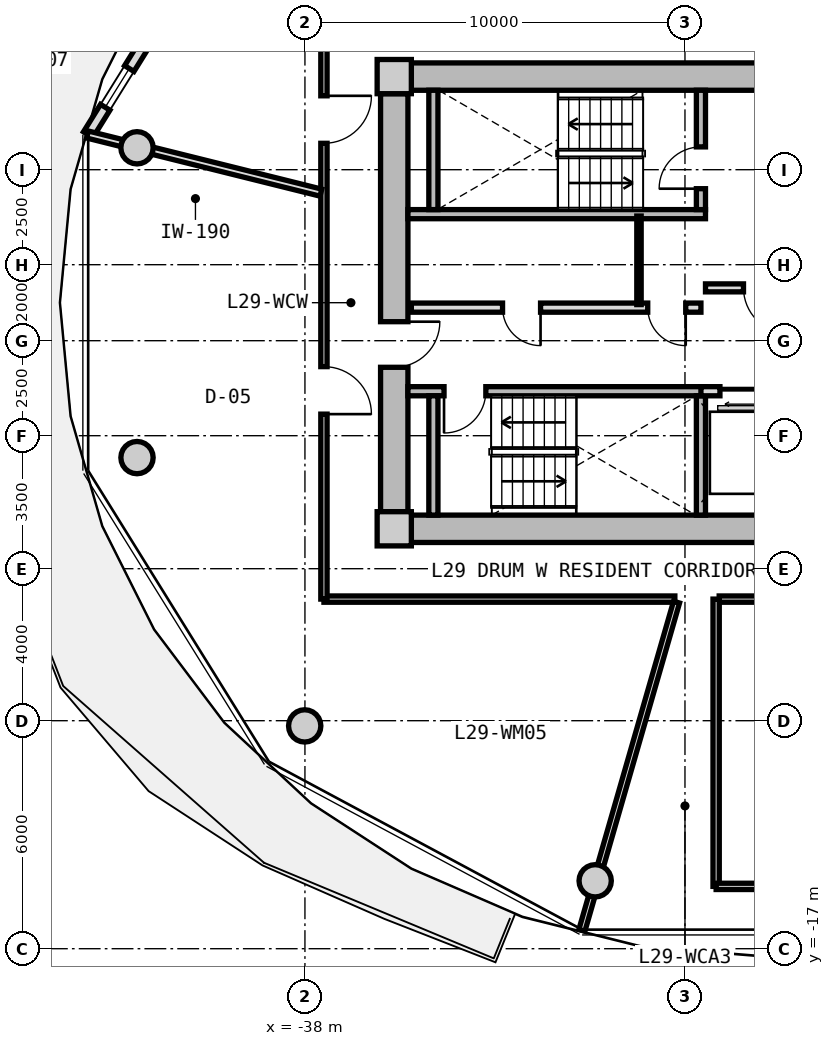
"""IFC4 building model, lengths in metres.
Left out: names, types, materials, properties, quantities, classifications, styles, units other than length and angle.
Written with IfcOpenShell. Run it as: python <this file> out.ifc"""

import sys

from ifc_helpers import new_model, si_unit, direction, frame, frame_2d, origin, origin_2d, place, context, subcontext, project, spatial, rectangle, circle, extrude, source, transform, mapped, element, fill, save


model = new_model("IFC4")
c1 = context("Model", 3, precision=1e-05, world=origin(), true_north=direction((0.0, 1.0)))
c2 = subcontext(c1, "Body", "Model", "MODEL_VIEW")
j1 = project(units=[si_unit("LENGTHUNIT", "METRE"), si_unit("PLANEANGLEUNIT", "RADIAN")], contexts=[c1])
p1 = place(None, origin())
s1 = spatial("IfcSite", under=j1, at=p1, CompositionType="ELEMENT")
p2 = place(p1, origin())
s2 = spatial("IfcBuilding", under=s1, at=p2, CompositionType="ELEMENT")
p3 = place(p2, frame((0.0, 0.0, 96.25)))
s3 = spatial("IfcBuildingStorey", under=s2, at=p3, CompositionType="ELEMENT", Elevation=96.25)
m1 = source(origin(), c2, "Body", "SweptSolid", [
    extrude(rectangle(XDim=0.9, YDim=0.9, at=origin_2d()), origin(), (0.0, 0.0, 1.0), 3.05),
])
for number, where, z_axis, x_axis in (
    (1, (-35.65, -5.95, 0.0), (0.0, 0.0, 1.0), (1.0, 0.0, 0.0)),
    (2, (-35.65, 5.95, 0.0), (0.0, 0.0, 1.0), (1.0, 0.0, 0.0)),
):
    element("IfcColumn", number, at=place(p3, frame(where, z_axis=z_axis, x_axis=x_axis)), inside=s3, PredefinedType="COLUMN", context=c2, shape_type="MappedRepresentation", body=[
        mapped(m1, transform((0.0, 0.0, 0.0), x_axis=(1.0, 0.0, 0.0), y_axis=(0.0, 1.0, 0.0), z_axis=(0.0, 0.0, 1.0), scale=1.0)),
    ])
m2 = source(origin(), c2, "Body", "SweptSolid", [
    extrude(rectangle(XDim=14.4, YDim=0.72, at=frame_2d((7.2, 0.0))), origin(), (0.0, 0.0, 1.0), 2.79),
])
for number, where, z_axis, x_axis in (
    (3, (-35.2, 5.95, 0.0), (0.0, 0.0, 1.0), (1.0, 0.0, 0.0)),
    (4, (-20.8, -5.95, 0.0), (0.0, 0.0, 1.0), (-1.0, 0.0, 0.0)),
):
    element("IfcWall", number, at=place(p3, frame(where, z_axis=z_axis, x_axis=x_axis)), inside=s3, PredefinedType="SHEAR", context=c2, shape_type="MappedRepresentation", body=[
        mapped(m2, transform((0.0, 0.0, 0.0), x_axis=(1.0, 0.0, 0.0), y_axis=(0.0, 1.0, 0.0), z_axis=(0.0, 0.0, 1.0), scale=1.0)),
    ])
m3 = source(origin(), c2, "Body", "SweptSolid", [
    extrude(rectangle(XDim=11.0, YDim=0.72, at=frame_2d((5.5, 0.0))), origin(), (0.0, 0.0, 1.0), 2.79),
])
p4 = place(p3, frame((-35.65, -5.5, 0.0), z_axis=(0.0, 0.0, 1.0), x_axis=(0.0, 1.0, 0.0)))
e5 = element("IfcWall", 5, at=p4, inside=s3, PredefinedType="SHEAR", context=c2, shape_type="MappedRepresentation", body=[
    mapped(m3, transform((0.0, 0.0, 0.0), x_axis=(1.0, 0.0, 0.0), y_axis=(0.0, 1.0, 0.0), z_axis=(0.0, 0.0, 1.0), scale=1.0)),
])
p5 = place(p4, frame((3.8, 0.0, 0.0)))
e6 = element("IfcOpeningElement", 6, at=p5, cuts=e5, PredefinedType="OPENING", context=c2, shape_type="SweptSolid", body=[
    extrude(rectangle(XDim=1.2, YDim=2.15, at=frame_2d((0.6, 1.075))), frame((0.0, 0.37, 0.0), z_axis=(0.0, -1.0, 0.0), x_axis=(1.0, 0.0, 0.0)), (0.0, 0.0, 1.0), 0.74),
])
m4 = source(origin(), c2, "Body", "SweptSolid", [
    extrude(circle(Radius=0.425, at=origin_2d()), origin(), (0.0, 0.0, 1.0), 3.05),
])
for number, where, z_axis, x_axis in (
    (7, (-42.419, 4.076, 0.0), (0.0, 0.0, 1.0), (1.0, 0.0, 0.0)),
    (8, (-42.419, -4.076, 0.0), (0.0, 0.0, 1.0), (1.0, 0.0, 0.0)),
    (9, (-38.006, -11.137, 0.0), (0.0, 0.0, 1.0), (1.0, 0.0, 0.0)),
    (10, (-30.363, -15.213, 0.0), (0.0, 0.0, 1.0), (1.0, 0.0, 0.0)),
):
    element("IfcColumn", number, at=place(p3, frame(where, z_axis=z_axis, x_axis=x_axis)), inside=s3, PredefinedType="COLUMN", context=c2, shape_type="MappedRepresentation", body=[
        mapped(m4, transform((0.0, 0.0, 0.0), x_axis=(1.0, 0.0, 0.0), y_axis=(0.0, 1.0, 0.0), z_axis=(0.0, 0.0, 1.0), scale=1.0)),
    ])
m5 = source(origin(), c2, "Body", "SweptSolid", [
    extrude(rectangle(XDim=9.014, YDim=0.29, at=frame_2d((4.507, 0.0))), origin(), (0.0, 0.0, 1.0), 2.79),
])
p6 = place(p3, frame((-43.704, 4.421, 0.0), z_axis=(0.0, 0.0, 1.0), x_axis=(0.527732945084, 0.849410347637, 0.0)))
e11 = element("IfcWall", 11, at=p6, inside=s3, PredefinedType="SOLIDWALL", context=c2, shape_type="MappedRepresentation", body=[
    mapped(m5, transform((0.0, 0.0, 0.0), x_axis=(1.0, 0.0, 0.0), y_axis=(0.0, 1.0, 0.0), z_axis=(0.0, 0.0, 1.0), scale=1.0)),
])
p7 = place(p6, frame((6.98, 0.0, 0.0)))
e12 = element("IfcOpeningElement", 12, at=p7, cuts=e11, PredefinedType="OPENING", context=c2, shape_type="SweptSolid", body=[
    extrude(rectangle(XDim=1.15, YDim=2.25, at=frame_2d((0.575, 1.125))), frame((0.0, 0.155, 0.0), z_axis=(0.0, -1.0, 0.0), x_axis=(1.0, 0.0, 0.0)), (0.0, 0.0, 1.0), 0.31),
])
p8 = place(p6, frame((0.85, 0.0, 0.85)))
e13 = element("IfcOpeningElement", 13, at=p8, cuts=e11, PredefinedType="OPENING", context=c2, shape_type="SweptSolid", body=[
    extrude(rectangle(XDim=1.2, YDim=1.5, at=frame_2d((0.6, 0.75))), frame((0.0, 0.155, 0.0), z_axis=(0.0, -1.0, 0.0), x_axis=(1.0, 0.0, 0.0)), (0.0, 0.0, 1.0), 0.31),
])
m6 = source(origin(), c2, "Body", "SweptSolid", [
    extrude(rectangle(XDim=7.83, YDim=0.24, at=frame_2d((3.915, 0.0))), origin(), (0.0, 0.0, 1.0), 2.79),
])
p9 = place(p3, frame((-35.29, 2.33, 0.0), z_axis=(0.0, 0.0, 1.0), x_axis=(1.0, 0.0, 0.0)))
e14 = element("IfcWall", 14, at=p9, inside=s3, PredefinedType="PARTITIONING", context=c2, shape_type="MappedRepresentation", body=[
    mapped(m6, transform((0.0, 0.0, 0.0), x_axis=(1.0, 0.0, 0.0), y_axis=(0.0, 1.0, 0.0), z_axis=(0.0, 0.0, 1.0), scale=1.0)),
])
m7 = source(origin(), c2, "Body", "SweptSolid", [
    extrude(rectangle(XDim=3.14, YDim=0.24, at=frame_2d((1.57, 0.0))), origin(), (0.0, 0.0, 1.0), 2.79),
])
p10 = place(p3, frame((-34.62, 2.45, 0.0), z_axis=(0.0, 0.0, 1.0), x_axis=(0.0, 1.0, 0.0)))
e15 = element("IfcWall", 15, at=p10, inside=s3, PredefinedType="PARTITIONING", context=c2, shape_type="MappedRepresentation", body=[
    mapped(m7, transform((0.0, 0.0, 0.0), x_axis=(1.0, 0.0, 0.0), y_axis=(0.0, 1.0, 0.0), z_axis=(0.0, 0.0, 1.0), scale=1.0)),
])
p11 = place(p3, frame((-27.58, 2.45, 0.0), z_axis=(0.0, 0.0, 1.0), x_axis=(0.0, 1.0, 0.0)))
e16 = element("IfcWall", 16, at=p11, inside=s3, PredefinedType="PARTITIONING", context=c2, shape_type="MappedRepresentation", body=[
    mapped(m7, transform((0.0, 0.0, 0.0), x_axis=(1.0, 0.0, 0.0), y_axis=(0.0, 1.0, 0.0), z_axis=(0.0, 0.0, 1.0), scale=1.0)),
])
p12 = place(p11, frame((0.55, 0.0, 0.0)))
e17 = element("IfcOpeningElement", 17, at=p12, cuts=e16, PredefinedType="OPENING", context=c2, shape_type="SweptSolid", body=[
    extrude(rectangle(XDim=1.1, YDim=2.15, at=frame_2d((0.55, 1.075))), frame((0.0, 0.13, 0.0), z_axis=(0.0, -1.0, 0.0), x_axis=(1.0, 0.0, 0.0)), (0.0, 0.0, 1.0), 0.26),
])
p13 = place(p3, frame((-35.29, -2.33, 0.0), z_axis=(0.0, 0.0, 1.0), x_axis=(1.0, 0.0, 0.0)))
e18 = element("IfcWall", 18, at=p13, inside=s3, PredefinedType="PARTITIONING", context=c2, shape_type="MappedRepresentation", body=[
    mapped(m6, transform((0.0, 0.0, 0.0), x_axis=(1.0, 0.0, 0.0), y_axis=(0.0, 1.0, 0.0), z_axis=(0.0, 0.0, 1.0), scale=1.0)),
])
p14 = place(p13, frame((0.95, 0.0, 0.0)))
e19 = element("IfcOpeningElement", 19, at=p14, cuts=e18, PredefinedType="OPENING", context=c2, shape_type="SweptSolid", body=[
    extrude(rectangle(XDim=1.1, YDim=2.15, at=frame_2d((0.55, 1.075))), frame((0.0, 0.13, 0.0), z_axis=(0.0, -1.0, 0.0), x_axis=(1.0, 0.0, 0.0)), (0.0, 0.0, 1.0), 0.26),
])
for number, where, z_axis, x_axis in (
    (20, (-34.62, -5.59, 0.0), (0.0, 0.0, 1.0), (0.0, 1.0, 0.0)),
    (21, (-27.58, -5.59, 0.0), (0.0, 0.0, 1.0), (0.0, 1.0, 0.0)),
):
    element("IfcWall", number, at=place(p3, frame(where, z_axis=z_axis, x_axis=x_axis)), inside=s3, PredefinedType="PARTITIONING", context=c2, shape_type="MappedRepresentation", body=[
        mapped(m7, transform((0.0, 0.0, 0.0), x_axis=(1.0, 0.0, 0.0), y_axis=(0.0, 1.0, 0.0), z_axis=(0.0, 0.0, 1.0), scale=1.0)),
    ])
m8 = source(origin(), c2, "Body", "SweptSolid", [
    extrude(rectangle(XDim=6.66, YDim=0.21, at=frame_2d((3.33, 0.0))), origin(), (0.0, 0.0, 1.0), 2.775),
])
p15 = place(p3, frame((-27.46, 0.39, 0.0), z_axis=(0.0, 0.0, 1.0), x_axis=(1.0, 0.0, 0.0)))
e22 = element("IfcWall", 22, at=p15, inside=s3, PredefinedType="PARTITIONING", context=c2, shape_type="MappedRepresentation", body=[
    mapped(m8, transform((0.0, 0.0, 0.0), x_axis=(1.0, 0.0, 0.0), y_axis=(0.0, 1.0, 0.0), z_axis=(0.0, 0.0, 1.0), scale=1.0)),
])
p16 = place(p15, frame((1.0, 0.0, 0.0)))
e23 = element("IfcOpeningElement", 23, at=p16, cuts=e22, PredefinedType="OPENING", context=c2, shape_type="SweptSolid", body=[
    extrude(rectangle(XDim=1.2, YDim=2.15, at=frame_2d((0.6, 1.075))), frame((0.0, 0.115, 0.0), z_axis=(0.0, -1.0, 0.0), x_axis=(1.0, 0.0, 0.0)), (0.0, 0.0, 1.0), 0.23),
])
m9 = source(origin(), c2, "Body", "SweptSolid", [
    extrude(rectangle(XDim=7.62, YDim=0.24, at=frame_2d((3.81, 0.0))), origin(), (0.0, 0.0, 1.0), 2.775),
])
p17 = place(p3, frame((-35.2, -0.13, 0.0), z_axis=(0.0, 0.0, 1.0), x_axis=(1.0, 0.0, 0.0)))
e24 = element("IfcWall", 24, at=p17, inside=s3, PredefinedType="PARTITIONING", context=c2, shape_type="MappedRepresentation", body=[
    mapped(m9, transform((0.0, 0.0, 0.0), x_axis=(1.0, 0.0, 0.0), y_axis=(0.0, 1.0, 0.0), z_axis=(0.0, 0.0, 1.0), scale=1.0)),
])
p18 = place(p17, frame((6.22, 0.0, 0.0)))
e25 = element("IfcOpeningElement", 25, at=p18, cuts=e24, PredefinedType="OPENING", context=c2, shape_type="SweptSolid", body=[
    extrude(rectangle(XDim=1.0, YDim=2.1, at=frame_2d((0.5, 1.05))), frame((0.0, 0.13, 0.0), z_axis=(0.0, -1.0, 0.0), x_axis=(1.0, 0.0, 0.0)), (0.0, 0.0, 1.0), 0.26),
])
p19 = place(p17, frame((2.4, 0.0, 0.0)))
e26 = element("IfcOpeningElement", 26, at=p19, cuts=e24, PredefinedType="OPENING", context=c2, shape_type="SweptSolid", body=[
    extrude(rectangle(XDim=1.0, YDim=2.1, at=frame_2d((0.5, 1.05))), frame((0.0, 0.13, 0.0), z_axis=(0.0, -1.0, 0.0), x_axis=(1.0, 0.0, 0.0)), (0.0, 0.0, 1.0), 0.26),
])
m10 = source(origin(), c2, "Body", "SweptSolid", [
    extrude(rectangle(XDim=2.33, YDim=0.115, at=frame_2d((1.165, 0.0))), origin(), (0.0, 0.0, 1.0), 2.775),
])
p20 = place(p3, frame((-29.21, -0.05, 0.0), z_axis=(0.0, 0.0, 1.0), x_axis=(0.0, 1.0, 0.0)))
e27 = element("IfcWall", 27, at=p20, inside=s3, PredefinedType="PARTITIONING", context=c2, shape_type="MappedRepresentation", body=[
    mapped(m10, transform((0.0, 0.0, 0.0), x_axis=(1.0, 0.0, 0.0), y_axis=(0.0, 1.0, 0.0), z_axis=(0.0, 0.0, 1.0), scale=1.0)),
])
m11 = source(origin(), c2, "Body", "SweptSolid", [
    extrude(rectangle(XDim=4.13, YDim=0.24, at=frame_2d((2.065, 0.0))), origin(), (0.0, 0.0, 1.0), 2.775),
])
p21 = place(p3, frame((-27.58, -2.33, 0.0), z_axis=(0.0, 0.0, 1.0), x_axis=(1.0, 0.0, 0.0)))
e28 = element("IfcWall", 28, at=p21, inside=s3, PredefinedType="PARTITIONING", context=c2, shape_type="MappedRepresentation", body=[
    mapped(m11, transform((0.0, 0.0, 0.0), x_axis=(1.0, 0.0, 0.0), y_axis=(0.0, 1.0, 0.0), z_axis=(0.0, 0.0, 1.0), scale=1.0)),
])
p22 = place(p21, frame((0.5, 0.0, 0.0)))
e29 = element("IfcOpeningElement", 29, at=p22, cuts=e28, PredefinedType="OPENING", context=c2, shape_type="SweptSolid", body=[
    extrude(rectangle(XDim=1.1, YDim=2.2, at=frame_2d((0.55, 1.1))), frame((0.0, 0.13, 0.0), z_axis=(0.0, -1.0, 0.0), x_axis=(1.0, 0.0, 0.0)), (0.0, 0.0, 1.0), 0.26),
])
m12 = source(origin(), c2, "Body", "SweptSolid", [
    extrude(rectangle(XDim=8.6, YDim=0.165, at=frame_2d((4.3, 0.0))), origin(), (0.0, 0.0, 1.0), 2.775),
])
p23 = place(p3, frame((-18.5, -7.8, 0.0), z_axis=(0.0, 0.0, 1.0), x_axis=(-1.0, 0.0, 0.0)))
e30 = element("IfcWall", 30, at=p23, inside=s3, PredefinedType="PARTITIONING", context=c2, shape_type="MappedRepresentation", body=[
    mapped(m12, transform((0.0, 0.0, 0.0), x_axis=(1.0, 0.0, 0.0), y_axis=(0.0, 1.0, 0.0), z_axis=(0.0, 0.0, 1.0), scale=1.0)),
])
p24 = place(p23, frame((3.775, 0.0, 0.0)))
e31 = element("IfcOpeningElement", 31, at=p24, cuts=e30, PredefinedType="OPENING", context=c2, shape_type="SweptSolid", body=[
    extrude(rectangle(XDim=1.05, YDim=2.15, at=frame_2d((0.525, 1.075))), frame((0.0, 0.093, 0.0), z_axis=(0.0, -1.0, 0.0), x_axis=(1.0, 0.0, 0.0)), (0.0, 0.0, 1.0), 0.185),
])
m13 = source(origin(), c2, "Body", "SweptSolid", [
    extrude(rectangle(XDim=9.234, YDim=0.165, at=frame_2d((4.617, 0.0))), origin(), (0.0, 0.0, 1.0), 2.775),
])
p25 = place(p3, frame((-28.266, -7.8, 0.0), z_axis=(0.0, 0.0, 1.0), x_axis=(-1.0, 0.0, 0.0)))
e32 = element("IfcWall", 32, at=p25, inside=s3, PredefinedType="PARTITIONING", context=c2, shape_type="MappedRepresentation", body=[
    mapped(m13, transform((0.0, 0.0, 0.0), x_axis=(1.0, 0.0, 0.0), y_axis=(0.0, 1.0, 0.0), z_axis=(0.0, 0.0, 1.0), scale=1.0)),
])
m14 = source(origin(), c2, "Body", "SweptSolid", [
    extrude(rectangle(XDim=15.6, YDim=0.165, at=frame_2d((7.8, 0.0))), origin(), (0.0, 0.0, 1.0), 2.775),
])
p26 = place(p3, frame((-37.5, -7.8, 0.0), z_axis=(0.0, 0.0, 1.0), x_axis=(0.0, 1.0, 0.0)))
e33 = element("IfcWall", 33, at=p26, inside=s3, PredefinedType="PARTITIONING", context=c2, shape_type="MappedRepresentation", body=[
    mapped(m14, transform((0.0, 0.0, 0.0), x_axis=(1.0, 0.0, 0.0), y_axis=(0.0, 1.0, 0.0), z_axis=(0.0, 0.0, 1.0), scale=1.0)),
])
p27 = place(p26, frame((11.994, 0.0, 0.0)))
e34 = element("IfcOpeningElement", 34, at=p27, cuts=e33, PredefinedType="OPENING", context=c2, shape_type="SweptSolid", body=[
    extrude(rectangle(XDim=1.25, YDim=2.2, at=frame_2d((0.625, 1.1))), frame((0.0, 0.093, 0.0), z_axis=(0.0, -1.0, 0.0), x_axis=(1.0, 0.0, 0.0)), (0.0, 0.0, 1.0), 0.185),
])
p28 = place(p26, frame((4.867, 0.0, 0.0)))
e35 = element("IfcOpeningElement", 35, at=p28, cuts=e33, PredefinedType="OPENING", context=c2, shape_type="SweptSolid", body=[
    extrude(rectangle(XDim=1.25, YDim=2.2, at=frame_2d((0.625, 1.1))), frame((0.0, 0.093, 0.0), z_axis=(0.0, -1.0, 0.0), x_axis=(1.0, 0.0, 0.0)), (0.0, 0.0, 1.0), 0.185),
])
m15 = source(origin(), c2, "Body", "SweptSolid", [
    extrude(rectangle(XDim=8.989, YDim=0.165, at=frame_2d((4.495, 0.0))), origin(), (0.0, 0.0, 1.0), 2.275),
])
p29 = place(p3, frame((-28.222, -7.88, 0.0), z_axis=(0.0, 0.0, 1.0), x_axis=(-0.27702323008, -0.960863221274, 0.0)))
e36 = element("IfcWall", 36, at=p29, inside=s3, PredefinedType="PARTITIONING", context=c2, shape_type="MappedRepresentation", body=[
    mapped(m15, transform((0.0, 0.0, 0.0), x_axis=(1.0, 0.0, 0.0), y_axis=(0.0, 1.0, 0.0), z_axis=(0.0, 0.0, 1.0), scale=1.0)),
])
m16 = source(origin(), c2, "Body", "SweptSolid", [
    extrude(rectangle(XDim=7.56, YDim=0.165, at=frame_2d((3.78, 0.0))), origin(), (0.0, 0.0, 1.0), 2.775),
])
p30 = place(p3, frame((-27.18, -15.36, 0.0), z_axis=(0.0, 0.0, 1.0), x_axis=(0.0, 1.0, 0.0)))
e37 = element("IfcWall", 37, at=p30, inside=s3, PredefinedType="PARTITIONING", context=c2, shape_type="MappedRepresentation", body=[
    mapped(m16, transform((0.0, 0.0, 0.0), x_axis=(1.0, 0.0, 0.0), y_axis=(0.0, 1.0, 0.0), z_axis=(0.0, 0.0, 1.0), scale=1.0)),
])
m17 = source(origin(), c2, "Body", "SweptSolid", [
    extrude(rectangle(XDim=8.407, YDim=0.165, at=frame_2d((4.204, 0.0))), origin(), (0.0, 0.0, 1.0), 2.275),
])
p31 = place(p3, frame((-27.18, -15.36, 0.0), z_axis=(0.0, 0.0, 1.0), x_axis=(1.0, 0.0, 0.0)))
e38 = element("IfcWall", 38, at=p31, inside=s3, PredefinedType="PARTITIONING", context=c2, shape_type="MappedRepresentation", body=[
    mapped(m17, transform((0.0, 0.0, 0.0), x_axis=(1.0, 0.0, 0.0), y_axis=(0.0, 1.0, 0.0), z_axis=(0.0, 0.0, 1.0), scale=1.0)),
])
m18 = source(origin(), c2, "Body", "SweptSolid", [
    extrude(rectangle(XDim=6.331, YDim=0.19, at=frame_2d((3.165, 0.0))), origin(), (0.0, 0.0, 1.0), 2.275),
])
p32 = place(p3, frame((-37.58, 2.896, 0.0), z_axis=(0.0, 0.0, 1.0), x_axis=(-0.97036440661, 0.241646267062, 0.0)))
e39 = element("IfcWall", 39, at=p32, inside=s3, PredefinedType="PARTITIONING", context=c2, shape_type="MappedRepresentation", body=[
    mapped(m18, transform((0.0, 0.0, 0.0), x_axis=(1.0, 0.0, 0.0), y_axis=(0.0, 1.0, 0.0), z_axis=(0.0, 0.0, 1.0), scale=1.0)),
])
m19 = source(origin(), c2, "Body", "SweptSolid", [
    extrude(rectangle(XDim=1.2, YDim=1.5, at=frame_2d((0.6, 0.75))), frame((0.0, 0.03, 0.0), z_axis=(0.0, -1.0, 0.0), x_axis=(1.0, 0.0, 0.0)), (0.0, 0.0, 1.0), 0.06),
])
p33 = place(p8, origin())
e40 = element("IfcWindow", 40, at=p33, inside=s3, PartitioningType="SINGLE_PANEL", PredefinedType="WINDOW", context=c2, shape_type="MappedRepresentation", body=[
    mapped(m19, transform((0.0, 0.0, 0.0), x_axis=(1.0, 0.0, 0.0), y_axis=(0.0, 1.0, 0.0), z_axis=(0.0, 0.0, 1.0), scale=1.0)),
])
fill(e13, e40)
m20 = source(origin(), c2, "Body", "SweptSolid", [
    extrude(rectangle(XDim=1.1, YDim=2.15, at=frame_2d((0.55, 1.075))), frame((0.0, 0.025, 0.0), z_axis=(0.0, -1.0, 0.0), x_axis=(1.0, 0.0, 0.0)), (0.0, 0.0, 1.0), 0.05),
])
p34 = place(p12, origin())
e41 = element("IfcDoor", 41, at=p34, inside=s3, OperationType="SINGLE_SWING_LEFT", PredefinedType="DOOR", context=c2, shape_type="MappedRepresentation", body=[
    mapped(m20, transform((0.0, 0.0, 0.0), x_axis=(1.0, 0.0, 0.0), y_axis=(0.0, 1.0, 0.0), z_axis=(0.0, 0.0, 1.0), scale=1.0)),
])
fill(e17, e41)
p35 = place(p14, frame((1.1, 0.0, 0.0), z_axis=(0.0, 0.0, 1.0), x_axis=(-1.0, 0.0, 0.0)))
e42 = element("IfcDoor", 42, at=p35, inside=s3, OperationType="SINGLE_SWING_RIGHT", PredefinedType="DOOR", context=c2, shape_type="MappedRepresentation", body=[
    mapped(m20, transform((0.0, 0.0, 0.0), x_axis=(1.0, 0.0, 0.0), y_axis=(0.0, 1.0, 0.0), z_axis=(0.0, 0.0, 1.0), scale=1.0)),
])
fill(e19, e42)
m21 = source(origin(), c2, "Body", "SweptSolid", [
    extrude(rectangle(XDim=1.2, YDim=2.15, at=frame_2d((0.6, 1.075))), frame((0.0, 0.025, 0.0), z_axis=(0.0, -1.0, 0.0), x_axis=(1.0, 0.0, 0.0)), (0.0, 0.0, 1.0), 0.05),
])
p36 = place(p16, frame((1.2, 0.0, 0.0), z_axis=(0.0, 0.0, 1.0), x_axis=(-1.0, 0.0, 0.0)))
e43 = element("IfcDoor", 43, at=p36, inside=s3, OperationType="SINGLE_SWING_LEFT", PredefinedType="DOOR", context=c2, shape_type="MappedRepresentation", body=[
    mapped(m21, transform((0.0, 0.0, 0.0), x_axis=(1.0, 0.0, 0.0), y_axis=(0.0, 1.0, 0.0), z_axis=(0.0, 0.0, 1.0), scale=1.0)),
])
fill(e23, e43)
p37 = place(p5, frame((1.2, 0.0, 0.0), z_axis=(0.0, 0.0, 1.0), x_axis=(-1.0, 0.0, 0.0)))
e44 = element("IfcDoor", 44, at=p37, inside=s3, OperationType="SINGLE_SWING_LEFT", PredefinedType="DOOR", context=c2, shape_type="MappedRepresentation", body=[
    mapped(m21, transform((0.0, 0.0, 0.0), x_axis=(1.0, 0.0, 0.0), y_axis=(0.0, 1.0, 0.0), z_axis=(0.0, 0.0, 1.0), scale=1.0)),
])
fill(e6, e44)
m22 = source(origin(), c2, "Body", "SweptSolid", [
    extrude(rectangle(XDim=1.0, YDim=2.1, at=frame_2d((0.5, 1.05))), frame((0.0, 0.025, 0.0), z_axis=(0.0, -1.0, 0.0), x_axis=(1.0, 0.0, 0.0)), (0.0, 0.0, 1.0), 0.05),
])
p38 = place(p18, frame((1.0, 0.0, 0.0), z_axis=(0.0, 0.0, 1.0), x_axis=(-1.0, 0.0, 0.0)))
e45 = element("IfcDoor", 45, at=p38, inside=s3, OperationType="SINGLE_SWING_LEFT", PredefinedType="DOOR", context=c2, shape_type="MappedRepresentation", body=[
    mapped(m22, transform((0.0, 0.0, 0.0), x_axis=(1.0, 0.0, 0.0), y_axis=(0.0, 1.0, 0.0), z_axis=(0.0, 0.0, 1.0), scale=1.0)),
])
fill(e25, e45)
p39 = place(p19, frame((1.0, 0.0, 0.0), z_axis=(0.0, 0.0, 1.0), x_axis=(-1.0, 0.0, 0.0)))
e46 = element("IfcDoor", 46, at=p39, inside=s3, OperationType="SINGLE_SWING_LEFT", PredefinedType="DOOR", context=c2, shape_type="MappedRepresentation", body=[
    mapped(m22, transform((0.0, 0.0, 0.0), x_axis=(1.0, 0.0, 0.0), y_axis=(0.0, 1.0, 0.0), z_axis=(0.0, 0.0, 1.0), scale=1.0)),
])
fill(e26, e46)
m23 = source(origin(), c2, "Body", "SweptSolid", [
    extrude(rectangle(XDim=1.1, YDim=2.2, at=frame_2d((0.55, 1.1))), frame((0.0, 0.025, 0.0), z_axis=(0.0, -1.0, 0.0), x_axis=(1.0, 0.0, 0.0)), (0.0, 0.0, 1.0), 0.05),
])
p40 = place(p22, frame((1.1, 0.0, 0.0), z_axis=(0.0, 0.0, 1.0), x_axis=(-1.0, 0.0, 0.0)))
e47 = element("IfcDoor", 47, at=p40, inside=s3, OperationType="SLIDING_TO_LEFT", PredefinedType="DOOR", context=c2, shape_type="MappedRepresentation", body=[
    mapped(m23, transform((0.0, 0.0, 0.0), x_axis=(1.0, 0.0, 0.0), y_axis=(0.0, 1.0, 0.0), z_axis=(0.0, 0.0, 1.0), scale=1.0)),
])
fill(e29, e47)
m24 = source(origin(), c2, "Body", "SweptSolid", [
    extrude(rectangle(XDim=1.25, YDim=2.2, at=frame_2d((0.625, 1.1))), frame((0.0, 0.025, 0.0), z_axis=(0.0, -1.0, 0.0), x_axis=(1.0, 0.0, 0.0)), (0.0, 0.0, 1.0), 0.05),
])
p41 = place(p27, frame((1.25, 0.0, 0.0), z_axis=(0.0, 0.0, 1.0), x_axis=(-1.0, 0.0, 0.0)))
e48 = element("IfcDoor", 48, at=p41, inside=s3, OperationType="SINGLE_SWING_LEFT", PredefinedType="DOOR", context=c2, shape_type="MappedRepresentation", body=[
    mapped(m24, transform((0.0, 0.0, 0.0), x_axis=(1.0, 0.0, 0.0), y_axis=(0.0, 1.0, 0.0), z_axis=(0.0, 0.0, 1.0), scale=1.0)),
])
fill(e34, e48)
p42 = place(p28, frame((1.25, 0.0, 0.0), z_axis=(0.0, 0.0, 1.0), x_axis=(-1.0, 0.0, 0.0)))
e49 = element("IfcDoor", 49, at=p42, inside=s3, OperationType="SINGLE_SWING_RIGHT", PredefinedType="DOOR", context=c2, shape_type="MappedRepresentation", body=[
    mapped(m24, transform((0.0, 0.0, 0.0), x_axis=(1.0, 0.0, 0.0), y_axis=(0.0, 1.0, 0.0), z_axis=(0.0, 0.0, 1.0), scale=1.0)),
])
fill(e35, e49)
save(model, sys.argv[1])
